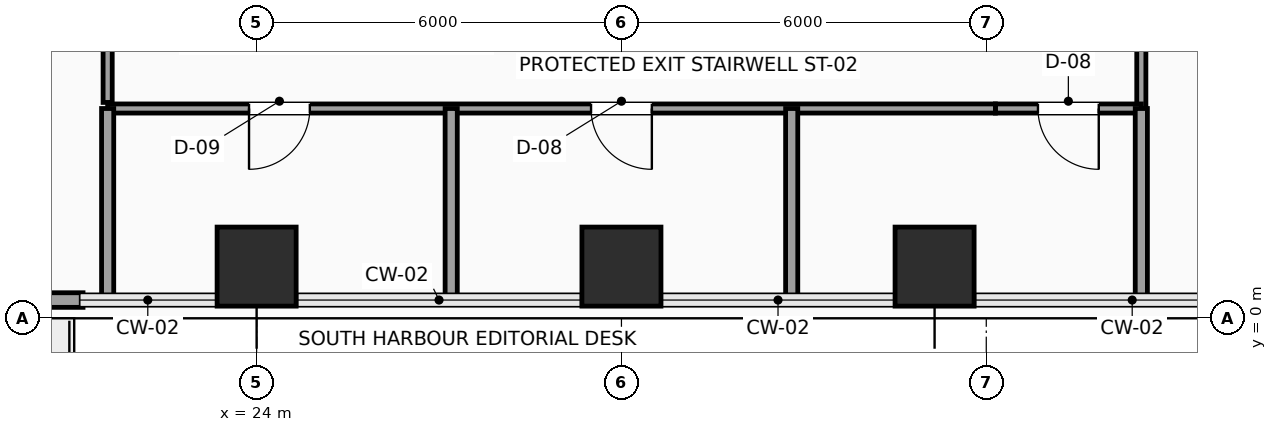
"""IFC4 building model, lengths in metres.
Left out: names, types, materials, properties, quantities, classifications, styles, units other than length and angle.
Written with IfcOpenShell. Run it as: python <this file> out.ifc"""

import sys

from ifc_helpers import new_model, si_unit, direction, frame, frame_2d, origin, origin_2d, place, context, subcontext, project, spatial, rectangle, extrude, element, fill, save


model = new_model("IFC4")
c1 = context("Model", 3, precision=1e-05, world=origin(), true_north=direction((0.0, 1.0)))
c2 = subcontext(c1, "Body", "Model", "MODEL_VIEW")
j1 = project(units=[si_unit("LENGTHUNIT", "METRE"), si_unit("PLANEANGLEUNIT", "RADIAN")], contexts=[c1])
p1 = place(None, origin())
s1 = spatial("IfcSite", under=j1, at=p1, CompositionType="ELEMENT")
p2 = place(p1, origin())
s2 = spatial("IfcBuilding", under=s1, at=p2, CompositionType="ELEMENT")
p3 = place(p2, frame((0.0, 0.0, 67.5)))
s3 = spatial("IfcBuildingStorey", under=s2, at=p3, CompositionType="ELEMENT", Elevation=67.5)
for number, where, z_axis, x_axis in (
    (1, (24.0, 0.85, 0.0), (0.0, 0.0, 1.0), (1.0, 0.0, 0.0)),
    (2, (30.0, 0.85, 0.0), (0.0, 0.0, 1.0), (1.0, 0.0, 0.0)),
    (3, (35.15, 0.85, 0.0), (0.0, 0.0, 1.0), (1.0, 0.0, 0.0)),
):
    element("IfcColumn", number, at=place(p3, frame(where, z_axis=z_axis, x_axis=x_axis)), inside=s3, PredefinedType="COLUMN", context=c2, shape_type="SweptSolid", body=[
        extrude(rectangle(XDim=1.3, YDim=1.3, at=origin_2d()), origin(), (0.0, 0.0, 1.0), 3.9),
    ])
p4 = place(p3, frame((21.145, 0.3, 0.0), z_axis=(0.0, 0.0, 1.0), x_axis=(-1.0, 0.0, 0.0)))
e4 = element("IfcWall", 4, at=p4, inside=s3, PredefinedType="SOLIDWALL", context=c2, shape_type="SweptSolid", body=[
    extrude(rectangle(XDim=9.29, YDim=0.24, at=frame_2d((4.645, 0.0))), origin(), (0.0, 0.0, 1.0), 3.65),
])
p5 = place(p4, frame((5.45, 0.0, 0.0)))
e5 = element("IfcOpeningElement", 5, at=p5, cuts=e4, PredefinedType="OPENING", context=c2, shape_type="SweptSolid", body=[
    extrude(rectangle(XDim=1.05, YDim=2.2, at=frame_2d((0.525, 1.1))), frame((0.0, 0.13, 0.0), z_axis=(0.0, -1.0, 0.0), x_axis=(1.0, 0.0, 0.0)), (0.0, 0.0, 1.0), 0.26),
])
p6 = place(p3, frame((38.55, 5.8, 0.0), z_axis=(0.0, 0.0, 1.0), x_axis=(0.0, -1.0, 0.0)))
e6 = element("IfcWall", 6, at=p6, inside=s3, PredefinedType="PARTITIONING", context=c2, shape_type="SweptSolid", body=[
    extrude(rectangle(XDim=2.35, YDim=0.15, at=frame_2d((1.175, 0.0))), origin(), (0.0, 0.0, 1.0), 3.65),
])
p7 = place(p3, frame((38.55, 3.45, 0.0), z_axis=(0.0, 0.0, 1.0), x_axis=(-1.0, 0.0, 0.0)))
e7 = element("IfcWall", 7, at=p7, inside=s3, PredefinedType="PARTITIONING", context=c2, shape_type="SweptSolid", body=[
    extrude(rectangle(XDim=2.4, YDim=0.15, at=frame_2d((1.2, 0.0))), origin(), (0.0, 0.0, 1.0), 3.142),
])
p8 = place(p7, frame((0.7, 0.0, 0.0)))
e8 = element("IfcOpeningElement", 8, at=p8, cuts=e7, PredefinedType="OPENING", context=c2, shape_type="SweptSolid", body=[
    extrude(rectangle(XDim=1.0, YDim=2.2, at=frame_2d((0.5, 1.1))), frame((0.0, 0.085, 0.0), z_axis=(0.0, -1.0, 0.0), x_axis=(1.0, 0.0, 0.0)), (0.0, 0.0, 1.0), 0.17),
])
p9 = place(p3, frame((36.15, 3.45, 0.0), z_axis=(0.0, 0.0, 1.0), x_axis=(-1.0, 0.0, 0.0)))
e9 = element("IfcWall", 9, at=p9, inside=s3, PredefinedType="PARTITIONING", context=c2, shape_type="SweptSolid", body=[
    extrude(rectangle(XDim=14.6, YDim=0.15, at=frame_2d((7.3, 0.0))), origin(), (0.0, 0.0, 1.0), 3.142),
])
p10 = place(p9, frame((11.275, 0.0, 0.0)))
e10 = element("IfcOpeningElement", 10, at=p10, cuts=e9, PredefinedType="OPENING", context=c2, shape_type="SweptSolid", body=[
    extrude(rectangle(XDim=1.0, YDim=2.2, at=frame_2d((0.5, 1.1))), frame((0.0, 0.085, 0.0), z_axis=(0.0, -1.0, 0.0), x_axis=(1.0, 0.0, 0.0)), (0.0, 0.0, 1.0), 0.17),
])
p11 = place(p9, frame((5.65, 0.0, 0.0)))
e11 = element("IfcOpeningElement", 11, at=p11, cuts=e9, PredefinedType="OPENING", context=c2, shape_type="SweptSolid", body=[
    extrude(rectangle(XDim=1.0, YDim=2.2, at=frame_2d((0.5, 1.1))), frame((0.0, 0.085, 0.0), z_axis=(0.0, -1.0, 0.0), x_axis=(1.0, 0.0, 0.0)), (0.0, 0.0, 1.0), 0.17),
])
p12 = place(p3, frame((21.55, 3.55, 0.0), z_axis=(0.0, 0.0, 1.0), x_axis=(0.0, 1.0, 0.0)))
e12 = element("IfcWall", 12, at=p12, inside=s3, PredefinedType="PARTITIONING", context=c2, shape_type="SweptSolid", body=[
    extrude(rectangle(XDim=2.25, YDim=0.15, at=frame_2d((1.125, 0.0))), origin(), (0.0, 0.0, 1.0), 3.65),
])
for number, where, z_axis, x_axis in (
    (13, (21.55, 0.3, 0.0), (0.0, 0.0, 1.0), (0.0, 1.0, 0.0)),
    (14, (27.2, 0.3, 0.0), (0.0, 0.0, 1.0), (0.0, 1.0, 0.0)),
    (15, (32.8, 0.3, 0.0), (0.0, 0.0, 1.0), (0.0, 1.0, 0.0)),
    (16, (38.55, 0.3, 0.0), (0.0, 0.0, 1.0), (0.0, 1.0, 0.0)),
):
    element("IfcWall", number, at=place(p3, frame(where, z_axis=z_axis, x_axis=x_axis)), inside=s3, PredefinedType="PARTITIONING", context=c2, shape_type="SweptSolid", body=[
        extrude(rectangle(XDim=3.15, YDim=0.2, at=frame_2d((1.575, 0.0))), origin(), (0.0, 0.0, 1.0), 3.65),
    ])
p13 = place(p8, origin())
e17 = element("IfcDoor", 17, at=p13, inside=s3, OperationType="SINGLE_SWING_LEFT", PredefinedType="DOOR", context=c2, shape_type="SweptSolid", body=[
    extrude(rectangle(XDim=1.0, YDim=2.2, at=frame_2d((0.5, 1.1))), frame((0.0, 0.025, 0.0), z_axis=(0.0, -1.0, 0.0), x_axis=(1.0, 0.0, 0.0)), (0.0, 0.0, 1.0), 0.05),
])
fill(e8, e17)
p14 = place(p10, origin())
e18 = element("IfcDoor", 18, at=p14, inside=s3, OperationType="SINGLE_SWING_RIGHT", PredefinedType="DOOR", context=c2, shape_type="SweptSolid", body=[
    extrude(rectangle(XDim=1.0, YDim=2.2, at=frame_2d((0.5, 1.1))), frame((0.0, 0.025, 0.0), z_axis=(0.0, -1.0, 0.0), x_axis=(1.0, 0.0, 0.0)), (0.0, 0.0, 1.0), 0.05),
])
fill(e10, e18)
p15 = place(p11, origin())
e19 = element("IfcDoor", 19, at=p15, inside=s3, OperationType="SINGLE_SWING_LEFT", PredefinedType="DOOR", context=c2, shape_type="SweptSolid", body=[
    extrude(rectangle(XDim=1.0, YDim=2.2, at=frame_2d((0.5, 1.1))), frame((0.0, 0.025, 0.0), z_axis=(0.0, -1.0, 0.0), x_axis=(1.0, 0.0, 0.0)), (0.0, 0.0, 1.0), 0.05),
])
fill(e11, e19)
save(model, sys.argv[1])
